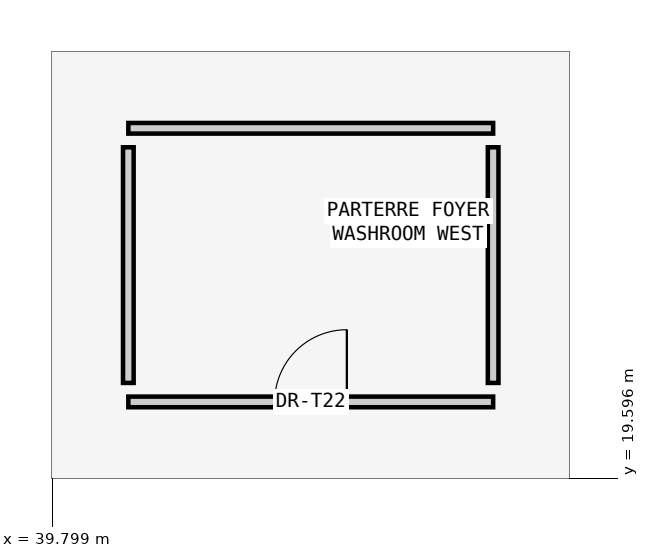
"""IFC4 building model, lengths in metres.
Left out: names, types, materials, properties, quantities, classifications, styles, units other than length and angle.
Written with IfcOpenShell. Run it as: python <this file> out.ifc"""

import sys

from ifc_helpers import new_model, si_unit, direction, frame, frame_2d, origin, place, context, subcontext, project, spatial, rectangle, extrude, element, fill, save


model = new_model("IFC4")
c1 = context("Model", 3, precision=1e-05, world=origin(), true_north=direction((0.0, 1.0)))
c2 = subcontext(c1, "Body", "Model", "MODEL_VIEW")
j1 = project(units=[si_unit("LENGTHUNIT", "METRE"), si_unit("PLANEANGLEUNIT", "RADIAN")], contexts=[c1])
p1 = place(None, origin())
s1 = spatial("IfcSite", under=j1, at=p1, CompositionType="ELEMENT")
p2 = place(p1, origin())
s2 = spatial("IfcBuilding", under=s1, at=p2, CompositionType="ELEMENT")
p3 = place(p2, frame((0.0, 0.0, 5.4)))
s3 = spatial("IfcBuildingStorey", under=s2, at=p3, CompositionType="ELEMENT", Elevation=5.4)
p4 = place(p3, frame((40.8, 20.6, 0.0), z_axis=(0.0, 0.0, 1.0), x_axis=(1.0, 0.0, 0.0)))
e1 = element("IfcWall", 1, at=p4, inside=s3, PredefinedType="PARTITIONING", context=c2, shape_type="SweptSolid", body=[
    extrude(rectangle(XDim=4.8, YDim=0.14, at=frame_2d((2.4, 0.0))), origin(), (0.0, 0.0, 1.0), 4.32),
])
p5 = place(p4, frame((1.925, 0.0, 0.0)))
e2 = element("IfcOpeningElement", 2, at=p5, cuts=e1, PredefinedType="OPENING", context=c2, shape_type="SweptSolid", body=[
    extrude(rectangle(XDim=0.95, YDim=2.15, at=frame_2d((0.475, 1.075))), frame((0.0, 0.08, 0.0), z_axis=(0.0, -1.0, 0.0), x_axis=(1.0, 0.0, 0.0)), (0.0, 0.0, 1.0), 0.16),
])
p6 = place(p3, frame((40.8, 24.2, 0.0), z_axis=(0.0, 0.0, 1.0), x_axis=(1.0, 0.0, 0.0)))
e3 = element("IfcWall", 3, at=p6, inside=s3, PredefinedType="PARTITIONING", context=c2, shape_type="SweptSolid", body=[
    extrude(rectangle(XDim=4.8, YDim=0.14, at=frame_2d((2.4, 0.0))), origin(), (0.0, 0.0, 1.0), 4.32),
])
for number, where, z_axis, x_axis in (
    (4, (40.8, 20.85, 0.0), (0.0, 0.0, 1.0), (0.0, 1.0, 0.0)),
    (5, (45.6, 20.85, 0.0), (0.0, 0.0, 1.0), (0.0, 1.0, 0.0)),
):
    element("IfcWall", number, at=place(p3, frame(where, z_axis=z_axis, x_axis=x_axis)), inside=s3, PredefinedType="PARTITIONING", context=c2, shape_type="SweptSolid", body=[
        extrude(rectangle(XDim=3.1, YDim=0.14, at=frame_2d((1.55, 0.0))), origin(), (0.0, 0.0, 1.0), 4.32),
    ])
p7 = place(p5, origin())
e6 = element("IfcDoor", 6, at=p7, inside=s3, OperationType="SINGLE_SWING_RIGHT", PredefinedType="DOOR", context=c2, shape_type="SweptSolid", body=[
    extrude(rectangle(XDim=0.95, YDim=2.15, at=frame_2d((0.475, 1.075))), frame((0.0, 0.025, 0.0), z_axis=(0.0, -1.0, 0.0), x_axis=(1.0, 0.0, 0.0)), (0.0, 0.0, 1.0), 0.05),
])
fill(e2, e6)
save(model, sys.argv[1])
